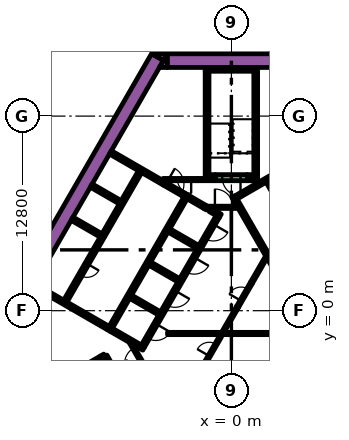
"""IFC4 building model, lengths in metres.
Left out: names, types, materials, properties, quantities, classifications, styles, units other than length and angle.
Written with IfcOpenShell. Run it as: python <this file> out.ifc"""

import sys

from ifc_helpers import new_model, si_unit, direction, frame, frame_2d, origin, place, context, subcontext, project, spatial, polyline, rectangle, outline, extrude, element, fill, save


model = new_model("IFC4")
c1 = context("Model", 3, precision=1e-05, world=origin(), true_north=direction((0.0, 1.0)))
c2 = subcontext(c1, "Body", "Model", "MODEL_VIEW")
j1 = project(units=[si_unit("LENGTHUNIT", "METRE"), si_unit("PLANEANGLEUNIT", "RADIAN")], contexts=[c1])
p1 = place(None, origin())
s1 = spatial("IfcSite", under=j1, at=p1, CompositionType="ELEMENT")
p2 = place(p1, origin())
s2 = spatial("IfcBuilding", under=s1, at=p2, CompositionType="ELEMENT")
p3 = place(p2, frame((0.0, 0.0, 16.2)))
s3 = spatial("IfcBuildingStorey", under=s2, at=p3, CompositionType="ELEMENT", Elevation=16.2)
p4 = place(p3, frame((-15.36, -1.503, 0.0), z_axis=(0.0, 0.0, 1.0), x_axis=(0.50000389221, 0.866023156604, 0.0)))
e1 = element("IfcWall", 1, at=p4, inside=s3, PredefinedType="SOLIDWALL", context=c2, shape_type="SweptSolid", body=[
    extrude(rectangle(XDim=21.0, YDim=0.9, at=frame_2d((10.5, 0.0))), origin(), (0.0, 0.0, 1.0), 5.4),
])
p5 = place(p3, origin())
e2 = element("IfcWall", 2, at=p5, inside=s3, PredefinedType="SOLIDWALL", context=c2, shape_type="SweptSolid", body=[
    extrude(outline(polyline([(-4.215, 16.9), (-4.469, 16.46), (-5.231, 16.9), (-4.215, 16.9)])), origin(), (0.0, 0.0, 1.0), 5.4),
])
p6 = place(p3, frame((-4.224, 16.45, 0.0), z_axis=(0.0, 0.0, 1.0), x_axis=(1.0, 0.0, 0.0)))
e3 = element("IfcWall", 3, at=p6, inside=s3, PredefinedType="SOLIDWALL", context=c2, shape_type="SweptSolid", body=[
    extrude(rectangle(XDim=9.488, YDim=0.9, at=frame_2d((4.744, 0.0))), origin(), (0.0, 0.0, 1.0), 5.4),
])
e4 = element("IfcWall", 4, at=p5, inside=s3, PredefinedType="SOLIDWALL", context=c2, shape_type="SweptSolid", body=[
    extrude(outline(polyline([(-4.734, 16.0), (-4.226, 16.88), (-4.226, 16.0), (-4.734, 16.0)])), origin(), (0.0, 0.0, 1.0), 5.4),
])
p7 = place(p3, frame((-1.725, 15.875, 0.0), z_axis=(0.0, 0.0, 1.0), x_axis=(1.0, 0.0, 0.0)))
e5 = element("IfcWall", 5, at=p7, inside=s3, PredefinedType="SOLIDWALL", context=c2, shape_type="SweptSolid", body=[
    extrude(rectangle(XDim=3.45, YDim=0.25, at=frame_2d((1.725, 0.0))), origin(), (0.0, 0.0, 1.0), 5.4),
])
p8 = place(p3, frame((1.6, 8.95, 0.0), z_axis=(0.0, 0.0, 1.0), x_axis=(0.0, 1.0, 0.0)))
e6 = element("IfcWall", 6, at=p8, inside=s3, PredefinedType="SOLIDWALL", context=c2, shape_type="SweptSolid", body=[
    extrude(rectangle(XDim=6.8, YDim=0.25, at=frame_2d((3.4, 0.0))), origin(), (0.0, 0.0, 1.0), 5.4),
])
p9 = place(p3, frame((1.05, 8.825, 0.0), z_axis=(0.0, 0.0, 1.0), x_axis=(1.0, 0.0, 0.0)))
e7 = element("IfcWall", 7, at=p9, inside=s3, PredefinedType="SOLIDWALL", context=c2, shape_type="SweptSolid", body=[
    extrude(rectangle(XDim=0.675, YDim=0.25, at=frame_2d((0.337, 0.0))), origin(), (0.0, 0.0, 1.0), 5.4),
])
p10 = place(p3, frame((-1.6, 8.7, 0.0), z_axis=(0.0, 0.0, 1.0), x_axis=(0.0, 1.0, 0.0)))
e8 = element("IfcWall", 8, at=p10, inside=s3, PredefinedType="SOLIDWALL", context=c2, shape_type="SweptSolid", body=[
    extrude(rectangle(XDim=7.05, YDim=0.25, at=frame_2d((3.525, 0.0))), origin(), (0.0, 0.0, 1.0), 5.4),
])
p11 = place(p3, frame((-1.475, 8.825, 0.0), z_axis=(0.0, 0.0, 1.0), x_axis=(1.0, 0.0, 0.0)))
e9 = element("IfcWall", 9, at=p11, inside=s3, PredefinedType="SOLIDWALL", context=c2, shape_type="SweptSolid", body=[
    extrude(rectangle(XDim=0.425, YDim=0.25, at=frame_2d((0.212, 0.0))), origin(), (0.0, 0.0, 1.0), 5.4),
])
p12 = place(p3, frame((-14.44, -6.49, 0.0), z_axis=(0.0, 0.0, 1.0), x_axis=(0.866022966069, 0.500004222222, 0.0)))
e10 = element("IfcWall", 10, at=p12, inside=s3, PredefinedType="SOLIDWALL", context=c2, shape_type="SweptSolid", body=[
    extrude(rectangle(XDim=6.8, YDim=0.25, at=frame_2d((3.4, 0.0))), origin(), (0.0, 0.0, 1.0), 5.4),
])
p13 = place(p3, frame((-8.168, -3.503, 0.0), z_axis=(0.0, 0.0, 1.0), x_axis=(-0.499952099219, 0.866053057547, 0.0)))
e11 = element("IfcWall", 11, at=p13, inside=s3, PredefinedType="SOLIDWALL", context=c2, shape_type="SweptSolid", body=[
    extrude(rectangle(XDim=0.675, YDim=0.25, at=frame_2d((0.337, 0.0))), origin(), (0.0, 0.0, 1.0), 5.4),
])
e12 = element("IfcWall", 12, at=p5, inside=s3, PredefinedType="SOLIDWALL", context=c2, shape_type="SweptSolid", body=[
    extrude(outline(polyline([(6.552, -3.348), (6.677, -3.564), (6.46, -3.689), (0.448, 6.725), (0.565, 6.725), (0.566, 6.725), (0.566, 6.725), (0.566, 6.875), (0.566, 6.875), (0.565, 6.875), (0.361, 6.875), (0.035, 7.439), (0.252, 7.564), (0.377, 7.348), (6.552, -3.348)])), origin(), (0.0, 0.0, 1.0), 5.4),
])
p14 = place(p3, frame((0.314, 7.456, 0.0), z_axis=(0.0, 0.0, 1.0), x_axis=(0.866013897511, 0.50001992892, 0.0)))
e13 = element("IfcWall", 13, at=p14, inside=s3, PredefinedType="SOLIDWALL", context=c2, shape_type="SweptSolid", body=[
    extrude(rectangle(XDim=3.268, YDim=0.25, at=frame_2d((1.634, 0.0))), origin(), (0.0, 0.0, 1.0), 5.4),
])
p15 = place(p3, frame((-8.06, -1.311, 0.0), z_axis=(0.0, 0.0, 1.0), x_axis=(0.50000273126, 0.866023826885, 0.0)))
e14 = element("IfcWall", 14, at=p15, inside=s3, PredefinedType="SOLIDWALL", context=c2, shape_type="SweptSolid", body=[
    extrude(rectangle(XDim=10.33, YDim=0.25, at=frame_2d((5.165, 0.0))), origin(), (0.0, 0.0, 1.0), 5.4),
])
p16 = place(p3, frame((-1.758, 6.835, 0.0), z_axis=(0.0, 0.0, 1.0), x_axis=(0.865982457891, -0.500074377092, 0.0)))
e15 = element("IfcWall", 15, at=p16, inside=s3, PredefinedType="SOLIDWALL", context=c2, shape_type="SweptSolid", body=[
    extrude(rectangle(XDim=0.2, YDim=0.25, at=frame_2d((0.1, 0.0))), origin(), (0.0, 0.0, 1.0), 5.4),
])
p17 = place(p3, frame((-1.76, 6.836, 0.0), z_axis=(0.0, 0.0, 1.0), x_axis=(-0.865952863304, 0.500125622755, 0.0)))
e16 = element("IfcWall", 16, at=p17, inside=s3, PredefinedType="SOLIDWALL", context=c2, shape_type="SweptSolid", body=[
    extrude(rectangle(XDim=1.258, YDim=0.25, at=frame_2d((0.629, 0.0))), origin(), (0.0, 0.0, 1.0), 5.4),
])
p18 = place(p3, frame((-0.728, 6.24, 0.0), z_axis=(0.0, 0.0, 1.0), x_axis=(-0.865955664968, 0.500120771724, 0.0)))
e17 = element("IfcWall", 17, at=p18, inside=s3, PredefinedType="SOLIDWALL", context=c2, shape_type="SweptSolid", body=[
    extrude(rectangle(XDim=0.778, YDim=0.25, at=frame_2d((0.389, 0.0))), origin(), (0.0, 0.0, 1.0), 5.4),
])
for number, where, z_axis, x_axis in (
    (18, (-2.204, 4.182, 0.0), (0.0, 0.0, 1.0), (-0.866, 0.5, 0.0)),
    (19, (-5.369, 3.1, 0.0), (0.0, 0.0, 1.0), (0.866, -0.5, 0.0)),
    (20, (-4.724, -0.182, 0.0), (0.0, 0.0, 1.0), (-0.866, 0.5, 0.0)),
):
    element("IfcWall", number, at=place(p3, frame(where, z_axis=z_axis, x_axis=x_axis)), inside=s3, PredefinedType="SOLIDWALL", context=c2, shape_type="SweptSolid", body=[
        extrude(rectangle(XDim=2.2, YDim=0.25, at=frame_2d((1.1, 0.0))), origin(), (0.0, 0.0, 1.0), 5.4),
    ])
e21 = element("IfcWall", 21, at=p5, inside=s3, PredefinedType="SOLIDWALL", context=c2, shape_type="SweptSolid", body=[
    extrude(outline(polyline([(-5.922, -2.257), (-5.922, -2.257), (-5.705, -2.382), (-5.83, -2.598), (-6.483, -2.221), (-6.591, -2.033), (-6.591, -2.033), (-6.7, -2.096), (-7.952, -1.373), (-7.827, -1.156), (-5.922, -2.257)])), origin(), (0.0, 0.0, 1.0), 5.4),
])
p19 = place(p3, frame((-8.106, -1.14, 0.0), z_axis=(0.0, 0.0, 1.0), x_axis=(-0.866000643155, 0.500042884217, 0.0)))
e22 = element("IfcWall", 22, at=p19, inside=s3, PredefinedType="SOLIDWALL", context=c2, shape_type="SweptSolid", body=[
    extrude(rectangle(XDim=5.65, YDim=0.25, at=frame_2d((2.825, 0.0))), origin(), (0.0, 0.0, 1.0), 5.4),
])
e23 = element("IfcWall", 23, at=p5, inside=s3, PredefinedType="SOLIDWALL", context=c2, shape_type="SweptSolid", body=[
    extrude(outline(polyline([(-3.128, 7.481), (-3.259, 7.557), (-3.134, 7.773), (-3.003, 7.698), (-3.128, 7.481)])), origin(), (0.0, 0.0, 1.0), 5.4),
])
for number, where, z_axis, x_axis in (
    (24, (-8.574, 4.95, 0.0), (0.0, 0.0, 1.0), (-0.866, 0.5, 0.0)),
    (25, (-7.314, 7.132, 0.0), (0.0, 0.0, 1.0), (-0.866, 0.5, 0.0)),
):
    element("IfcWall", number, at=place(p3, frame(where, z_axis=z_axis, x_axis=x_axis)), inside=s3, PredefinedType="SOLIDWALL", context=c2, shape_type="SweptSolid", body=[
        extrude(rectangle(XDim=2.2, YDim=0.25, at=frame_2d((1.1, 0.0))), origin(), (0.0, 0.0, 1.0), 5.4),
    ])
p20 = place(p3, frame((-7.959, 10.415, 0.0), z_axis=(0.0, 0.0, 1.0), x_axis=(0.866020958405, -0.500007699544, 0.0)))
e26 = element("IfcWall", 26, at=p20, inside=s3, PredefinedType="SOLIDWALL", context=c2, shape_type="SweptSolid", body=[
    extrude(rectangle(XDim=4.1, YDim=0.25, at=frame_2d((2.05, 0.0))), origin(), (0.0, 0.0, 1.0), 5.4),
])
p21 = place(p3, frame((-8.252, -2.958, 0.0), z_axis=(0.0, 0.0, 1.0), x_axis=(0.500174715838, -0.865924508047, 0.0)))
e27 = element("IfcWall", 27, at=p21, inside=s3, PredefinedType="PARTITIONING", context=c2, shape_type="SweptSolid", body=[
    extrude(rectangle(XDim=0.514, YDim=0.15, at=frame_2d((0.257, 0.0))), origin(), (0.0, 0.0, 1.0), 4.1),
])
p22 = place(p3, frame((-3.997, 8.625, 0.0), z_axis=(0.0, 0.0, 1.0), x_axis=(-1.0, 0.0, 0.0)))
e28 = element("IfcWall", 28, at=p22, inside=s3, PredefinedType="PARTITIONING", context=c2, shape_type="SweptSolid", body=[
    extrude(rectangle(XDim=0.502, YDim=0.15, at=frame_2d((0.251, 0.0))), origin(), (0.0, 0.0, 1.0), 4.1),
])
p23 = place(p3, frame((-2.196, 8.625, 0.0), z_axis=(0.0, 0.0, 1.0), x_axis=(1.0, 0.0, 0.0)))
e29 = element("IfcWall", 29, at=p23, inside=s3, PredefinedType="PARTITIONING", context=c2, shape_type="SweptSolid", body=[
    extrude(rectangle(XDim=1.146, YDim=0.15, at=frame_2d((0.573, 0.0))), origin(), (0.0, 0.0, 1.0), 4.1),
])
p24 = place(p3, frame((-4.2, -1.5, 0.0), z_axis=(0.0, 0.0, 1.0), x_axis=(1.0, 0.0, 0.0)))
e30 = element("IfcWall", 30, at=p24, inside=s3, PredefinedType="PARTITIONING", context=c2, shape_type="SweptSolid", body=[
    extrude(rectangle(XDim=9.359, YDim=0.15, at=frame_2d((4.68, 0.0))), origin(), (0.0, 0.0, 1.0), 4.1),
])
p25 = place(p3, frame((-0.544, -1.393, 0.0), z_axis=(0.0, 0.0, 1.0), x_axis=(0.499928740635, 0.866066541489, 0.0)))
e31 = element("IfcWall", 31, at=p25, inside=s3, PredefinedType="PARTITIONING", context=c2, shape_type="SweptSolid", body=[
    extrude(rectangle(XDim=1.912, YDim=0.15, at=frame_2d((0.956, 0.0))), origin(), (0.0, 0.0, 1.0), 4.1),
])
p26 = place(p3, frame((1.312, 1.822, 0.0), z_axis=(0.0, 0.0, 1.0), x_axis=(0.500003549559, 0.866023354436, 0.0)))
e32 = element("IfcWall", 32, at=p26, inside=s3, PredefinedType="PARTITIONING", context=c2, shape_type="SweptSolid", body=[
    extrude(rectangle(XDim=1.93, YDim=0.15, at=frame_2d((0.965, 0.0))), origin(), (0.0, 0.0, 1.0), 4.1),
])
p27 = place(p3, frame((1.05, 8.625, 0.0), z_axis=(0.0, 0.0, 1.0), x_axis=(1.0, 0.0, 0.0)))
e33 = element("IfcWall", 33, at=p27, inside=s3, PredefinedType="PARTITIONING", context=c2, shape_type="SweptSolid", body=[
    extrude(rectangle(XDim=0.514, YDim=0.15, at=frame_2d((0.257, 0.0))), origin(), (0.0, 0.0, 1.0), 4.1),
])
p28 = place(p3, frame((8.565, -2.185, 0.0), z_axis=(0.0, 0.0, 1.0), x_axis=(-0.499997954832, 0.866026584559, 0.0)))
e34 = element("IfcWall", 34, at=p28, inside=s3, PredefinedType="SOLIDWALL", context=c2, shape_type="SweptSolid", body=[
    extrude(rectangle(XDim=12.35, YDim=0.25, at=frame_2d((6.175, 0.0))), origin(), (0.0, 0.0, 1.0), 5.4),
])
p29 = place(p28, frame((5.725, 0.0, 0.0)))
e35 = element("IfcOpeningElement", 35, at=p29, cuts=e34, PredefinedType="OPENING", context=c2, shape_type="SweptSolid", body=[
    extrude(rectangle(XDim=0.9, YDim=2.1, at=frame_2d((0.45, 1.05))), frame((0.0, 0.135, 0.0), z_axis=(0.0, -1.0, 0.0), x_axis=(1.0, 0.0, 0.0)), (0.0, 0.0, 1.0), 0.27),
])
p30 = place(p3, frame((-6.008, 9.144, 0.0), z_axis=(0.0, 0.0, 1.0), x_axis=(-0.500006956611, -0.866021387346, 0.0)))
e36 = element("IfcWall", 36, at=p30, inside=s3, PredefinedType="SOLIDWALL", context=c2, shape_type="SweptSolid", body=[
    extrude(rectangle(XDim=9.83, YDim=0.25, at=frame_2d((4.915, 0.0))), origin(), (0.0, 0.0, 1.0), 5.4),
])
p31 = place(p30, frame((6.985, 0.0, 0.0)))
e37 = element("IfcOpeningElement", 37, at=p31, cuts=e36, PredefinedType="OPENING", context=c2, shape_type="SweptSolid", body=[
    extrude(rectangle(XDim=0.9, YDim=2.1, at=frame_2d((0.45, 1.05))), frame((0.0, 0.135, 0.0), z_axis=(0.0, -1.0, 0.0), x_axis=(1.0, 0.0, 0.0)), (0.0, 0.0, 1.0), 0.27),
])
p32 = place(p3, frame((-0.898, 6.194, 0.0), z_axis=(0.0, 0.0, 1.0), x_axis=(-0.499996202215, -0.866027596426, 0.0)))
e38 = element("IfcWall", 38, at=p32, inside=s3, PredefinedType="SOLIDWALL", context=c2, shape_type="SweptSolid", body=[
    extrude(rectangle(XDim=9.83, YDim=0.25, at=frame_2d((4.915, 0.0))), origin(), (0.0, 0.0, 1.0), 5.4),
])
p33 = place(p32, frame((0.585, 0.0, 0.0)))
e39 = element("IfcOpeningElement", 39, at=p33, cuts=e38, PredefinedType="OPENING", context=c2, shape_type="SweptSolid", body=[
    extrude(rectangle(XDim=1.1, YDim=2.1, at=frame_2d((0.55, 1.05))), frame((0.0, 0.135, 0.0), z_axis=(0.0, -1.0, 0.0), x_axis=(1.0, 0.0, 0.0)), (0.0, 0.0, 1.0), 0.27),
])
p34 = place(p32, frame((3.105, 0.0, 0.0)))
e40 = element("IfcOpeningElement", 40, at=p34, cuts=e38, PredefinedType="OPENING", context=c2, shape_type="SweptSolid", body=[
    extrude(rectangle(XDim=1.1, YDim=2.1, at=frame_2d((0.55, 1.05))), frame((0.0, 0.135, 0.0), z_axis=(0.0, -1.0, 0.0), x_axis=(1.0, 0.0, 0.0)), (0.0, 0.0, 1.0), 0.27),
])
p35 = place(p32, frame((5.625, 0.0, 0.0)))
e41 = element("IfcOpeningElement", 41, at=p35, cuts=e38, PredefinedType="OPENING", context=c2, shape_type="SweptSolid", body=[
    extrude(rectangle(XDim=1.1, YDim=2.1, at=frame_2d((0.55, 1.05))), frame((0.0, 0.135, 0.0), z_axis=(0.0, -1.0, 0.0), x_axis=(1.0, 0.0, 0.0)), (0.0, 0.0, 1.0), 0.27),
])
p36 = place(p32, frame((8.145, 0.0, 0.0)))
e42 = element("IfcOpeningElement", 42, at=p36, cuts=e38, PredefinedType="OPENING", context=c2, shape_type="SweptSolid", body=[
    extrude(rectangle(XDim=1.1, YDim=2.1, at=frame_2d((0.55, 1.05))), frame((0.0, 0.135, 0.0), z_axis=(0.0, -1.0, 0.0), x_axis=(1.0, 0.0, 0.0)), (0.0, 0.0, 1.0), 0.27),
])
p37 = place(p3, frame((1.05, 8.75, 0.0), z_axis=(0.0, 0.0, 1.0), x_axis=(-1.0, 0.0, 0.0)))
e43 = element("IfcWall", 43, at=p37, inside=s3, PredefinedType="SOLIDWALL", context=c2, shape_type="SweptSolid", body=[
    extrude(rectangle(XDim=2.1, YDim=0.4, at=frame_2d((1.05, 0.0))), origin(), (0.0, 0.0, 1.0), 5.4),
])
p38 = place(p37, frame((0.45, 0.0, 0.0)))
e44 = element("IfcOpeningElement", 44, at=p38, cuts=e43, PredefinedType="OPENING", context=c2, shape_type="SweptSolid", body=[
    extrude(rectangle(XDim=1.2, YDim=2.1, at=frame_2d((0.6, 1.05))), frame((0.0, 0.21, 0.0), z_axis=(0.0, -1.0, 0.0), x_axis=(1.0, 0.0, 0.0)), (0.0, 0.0, 1.0), 0.42),
])
p39 = place(p3, frame((-2.196, 8.625, 0.0), z_axis=(0.0, 0.0, 1.0), x_axis=(-1.0, 0.0, 0.0)))
e45 = element("IfcWall", 45, at=p39, inside=s3, PredefinedType="PARTITIONING", context=c2, shape_type="SweptSolid", body=[
    extrude(rectangle(XDim=1.8, YDim=0.15, at=frame_2d((0.9, 0.0))), origin(), (0.0, 0.0, 1.0), 4.1),
])
p40 = place(p39, frame((0.45, 0.0, 0.0)))
e46 = element("IfcOpeningElement", 46, at=p40, cuts=e45, PredefinedType="OPENING", context=c2, shape_type="SweptSolid", body=[
    extrude(rectangle(XDim=0.9, YDim=2.1, at=frame_2d((0.45, 1.05))), frame((0.0, 0.085, 0.0), z_axis=(0.0, -1.0, 0.0), x_axis=(1.0, 0.0, 0.0)), (0.0, 0.0, 1.0), 0.17),
])
p41 = place(p3, frame((-1.76, -3.498, 0.0), z_axis=(0.0, 0.0, 1.0), x_axis=(0.499977374825, 0.866038466041, 0.0)))
e47 = element("IfcWall", 47, at=p41, inside=s3, PredefinedType="PARTITIONING", context=c2, shape_type="SweptSolid", body=[
    extrude(rectangle(XDim=2.1, YDim=0.15, at=frame_2d((1.05, 0.0))), origin(), (0.0, 0.0, 1.0), 4.1),
])
p42 = place(p41, frame((0.6, 0.0, 0.0)))
e48 = element("IfcOpeningElement", 48, at=p42, cuts=e47, PredefinedType="OPENING", context=c2, shape_type="SweptSolid", body=[
    extrude(rectangle(XDim=0.9, YDim=2.1, at=frame_2d((0.45, 1.05))), frame((0.0, 0.085, 0.0), z_axis=(0.0, -1.0, 0.0), x_axis=(1.0, 0.0, 0.0)), (0.0, 0.0, 1.0), 0.17),
])
p43 = place(p3, frame((-1.534, 6.8, 0.0), z_axis=(0.0, 0.0, 1.0), x_axis=(1.0, 0.0, 0.0)))
e49 = element("IfcWall", 49, at=p43, inside=s3, PredefinedType="PARTITIONING", context=c2, shape_type="SweptSolid", body=[
    extrude(rectangle(XDim=2.1, YDim=0.15, at=frame_2d((1.05, 0.0))), origin(), (0.0, 0.0, 1.0), 4.1),
])
p44 = place(p43, frame((0.45, 0.0, 0.0)))
e50 = element("IfcOpeningElement", 50, at=p44, cuts=e49, PredefinedType="OPENING", context=c2, shape_type="SweptSolid", body=[
    extrude(rectangle(XDim=1.2, YDim=2.1, at=frame_2d((0.6, 1.05))), frame((0.0, 0.085, 0.0), z_axis=(0.0, -1.0, 0.0), x_axis=(1.0, 0.0, 0.0)), (0.0, 0.0, 1.0), 0.17),
])
p45 = place(p3, frame((-5.606, -3.89, 0.0), z_axis=(0.0, 0.0, 1.0), x_axis=(-0.500027713859, 0.866009402589, 0.0)))
e51 = element("IfcWall", 51, at=p45, inside=s3, PredefinedType="PARTITIONING", context=c2, shape_type="SweptSolid", body=[
    extrude(rectangle(XDim=2.1, YDim=0.15, at=frame_2d((1.05, 0.0))), origin(), (0.0, 0.0, 1.0), 4.1),
])
p46 = place(p45, frame((0.45, 0.0, 0.0)))
e52 = element("IfcOpeningElement", 52, at=p46, cuts=e51, PredefinedType="OPENING", context=c2, shape_type="SweptSolid", body=[
    extrude(rectangle(XDim=1.2, YDim=2.1, at=frame_2d((0.6, 1.05))), frame((0.0, 0.085, 0.0), z_axis=(0.0, -1.0, 0.0), x_axis=(1.0, 0.0, 0.0)), (0.0, 0.0, 1.0), 0.17),
])
p47 = place(p3, frame((-4.409, 8.365, 0.0), z_axis=(0.0, 0.0, 1.0), x_axis=(0.866034573852, -0.49998411664, 0.0)))
e53 = element("IfcWall", 53, at=p47, inside=s3, PredefinedType="SOLIDWALL", context=c2, shape_type="SweptSolid", body=[
    extrude(rectangle(XDim=1.4, YDim=0.25, at=frame_2d((0.7, 0.0))), origin(), (0.0, 0.0, 1.0), 5.4),
])
p48 = place(p47, frame((0.1, 0.0, 0.0)))
e54 = element("IfcOpeningElement", 54, at=p48, cuts=e53, PredefinedType="OPENING", context=c2, shape_type="SweptSolid", body=[
    extrude(rectangle(XDim=1.2, YDim=2.1, at=frame_2d((0.6, 1.05))), frame((0.0, 0.135, 0.0), z_axis=(0.0, -1.0, 0.0), x_axis=(1.0, 0.0, 0.0)), (0.0, 0.0, 1.0), 0.27),
])
p49 = place(p3, frame((0.412, 0.263, 0.0), z_axis=(0.0, 0.0, 1.0), x_axis=(0.500062916607, 0.865989075817, 0.0)))
e55 = element("IfcWall", 55, at=p49, inside=s3, PredefinedType="PARTITIONING", context=c2, shape_type="SweptSolid", body=[
    extrude(rectangle(XDim=1.8, YDim=0.15, at=frame_2d((0.9, 0.0))), origin(), (0.0, 0.0, 1.0), 4.1),
])
p50 = place(p49, frame((0.45, 0.0, 0.0)))
e56 = element("IfcOpeningElement", 56, at=p50, cuts=e55, PredefinedType="OPENING", context=c2, shape_type="SweptSolid", body=[
    extrude(rectangle(XDim=0.9, YDim=2.1, at=frame_2d((0.45, 1.05))), frame((0.0, 0.085, 0.0), z_axis=(0.0, -1.0, 0.0), x_axis=(1.0, 0.0, 0.0)), (0.0, 0.0, 1.0), 0.17),
])
p51 = place(p3, frame((-6.875, 40.198, 0.0), z_axis=(0.0, 0.0, 1.0), x_axis=(-0.500000527961, -0.866025098966, 0.0)))
e57 = element("IfcWall", 57, at=p51, inside=s3, PredefinedType="SOLIDWALL", context=c2, shape_type="SweptSolid", body=[
    extrude(rectangle(XDim=62.75, YDim=0.25, at=frame_2d((31.375, 0.0))), origin(), (0.0, 0.0, 1.0), 5.0),
])
p52 = place(p31, origin())
e58 = element("IfcDoor", 58, at=p52, inside=s3, OperationType="SINGLE_SWING_LEFT", PredefinedType="DOOR", context=c2, shape_type="SweptSolid", body=[
    extrude(rectangle(XDim=0.9, YDim=2.1, at=frame_2d((0.45, 1.05))), frame((0.0, 0.025, 0.0), z_axis=(0.0, -1.0, 0.0), x_axis=(1.0, 0.0, 0.0)), (0.0, 0.0, 1.0), 0.05),
])
fill(e37, e58)
p53 = place(p33, origin())
e59 = element("IfcDoor", 59, at=p53, inside=s3, OperationType="DOUBLE_DOOR_SLIDING", PredefinedType="DOOR", context=c2, shape_type="SweptSolid", body=[
    extrude(rectangle(XDim=1.1, YDim=2.1, at=frame_2d((0.55, 1.05))), frame((0.0, 0.025, 0.0), z_axis=(0.0, -1.0, 0.0), x_axis=(1.0, 0.0, 0.0)), (0.0, 0.0, 1.0), 0.05),
])
fill(e39, e59)
p54 = place(p34, origin())
e60 = element("IfcDoor", 60, at=p54, inside=s3, OperationType="DOUBLE_DOOR_SLIDING", PredefinedType="DOOR", context=c2, shape_type="SweptSolid", body=[
    extrude(rectangle(XDim=1.1, YDim=2.1, at=frame_2d((0.55, 1.05))), frame((0.0, 0.025, 0.0), z_axis=(0.0, -1.0, 0.0), x_axis=(1.0, 0.0, 0.0)), (0.0, 0.0, 1.0), 0.05),
])
fill(e40, e60)
p55 = place(p35, origin())
e61 = element("IfcDoor", 61, at=p55, inside=s3, OperationType="DOUBLE_DOOR_SLIDING", PredefinedType="DOOR", context=c2, shape_type="SweptSolid", body=[
    extrude(rectangle(XDim=1.1, YDim=2.1, at=frame_2d((0.55, 1.05))), frame((0.0, 0.025, 0.0), z_axis=(0.0, -1.0, 0.0), x_axis=(1.0, 0.0, 0.0)), (0.0, 0.0, 1.0), 0.05),
])
fill(e41, e61)
p56 = place(p36, origin())
e62 = element("IfcDoor", 62, at=p56, inside=s3, OperationType="DOUBLE_DOOR_SLIDING", PredefinedType="DOOR", context=c2, shape_type="SweptSolid", body=[
    extrude(rectangle(XDim=1.1, YDim=2.1, at=frame_2d((0.55, 1.05))), frame((0.0, 0.025, 0.0), z_axis=(0.0, -1.0, 0.0), x_axis=(1.0, 0.0, 0.0)), (0.0, 0.0, 1.0), 0.05),
])
fill(e42, e62)
p57 = place(p38, origin())
e63 = element("IfcDoor", 63, at=p57, inside=s3, OperationType="SINGLE_SWING_LEFT", PredefinedType="DOOR", context=c2, shape_type="SweptSolid", body=[
    extrude(rectangle(XDim=1.2, YDim=2.1, at=frame_2d((0.6, 1.05))), frame((0.0, 0.025, 0.0), z_axis=(0.0, -1.0, 0.0), x_axis=(1.0, 0.0, 0.0)), (0.0, 0.0, 1.0), 0.05),
])
fill(e44, e63)
p58 = place(p40, origin())
e64 = element("IfcDoor", 64, at=p58, inside=s3, OperationType="SINGLE_SWING_LEFT", PredefinedType="DOOR", context=c2, shape_type="SweptSolid", body=[
    extrude(rectangle(XDim=0.9, YDim=2.1, at=frame_2d((0.45, 1.05))), frame((0.0, 0.025, 0.0), z_axis=(0.0, -1.0, 0.0), x_axis=(1.0, 0.0, 0.0)), (0.0, 0.0, 1.0), 0.05),
])
fill(e46, e64)
p59 = place(p42, origin())
e65 = element("IfcDoor", 65, at=p59, inside=s3, OperationType="SINGLE_SWING_LEFT", PredefinedType="DOOR", context=c2, shape_type="SweptSolid", body=[
    extrude(rectangle(XDim=0.9, YDim=2.1, at=frame_2d((0.45, 1.05))), frame((0.0, 0.025, 0.0), z_axis=(0.0, -1.0, 0.0), x_axis=(1.0, 0.0, 0.0)), (0.0, 0.0, 1.0), 0.05),
])
fill(e48, e65)
p60 = place(p44, origin())
e66 = element("IfcDoor", 66, at=p60, inside=s3, OperationType="SINGLE_SWING_LEFT", PredefinedType="DOOR", context=c2, shape_type="SweptSolid", body=[
    extrude(rectangle(XDim=1.2, YDim=2.1, at=frame_2d((0.6, 1.05))), frame((0.0, 0.025, 0.0), z_axis=(0.0, -1.0, 0.0), x_axis=(1.0, 0.0, 0.0)), (0.0, 0.0, 1.0), 0.05),
])
fill(e50, e66)
p61 = place(p46, origin())
e67 = element("IfcDoor", 67, at=p61, inside=s3, OperationType="SINGLE_SWING_LEFT", PredefinedType="DOOR", context=c2, shape_type="SweptSolid", body=[
    extrude(rectangle(XDim=1.2, YDim=2.1, at=frame_2d((0.6, 1.05))), frame((0.0, 0.025, 0.0), z_axis=(0.0, -1.0, 0.0), x_axis=(1.0, 0.0, 0.0)), (0.0, 0.0, 1.0), 0.05),
])
fill(e52, e67)
p62 = place(p48, origin())
e68 = element("IfcDoor", 68, at=p62, inside=s3, OperationType="SINGLE_SWING_LEFT", PredefinedType="DOOR", context=c2, shape_type="SweptSolid", body=[
    extrude(rectangle(XDim=1.2, YDim=2.1, at=frame_2d((0.6, 1.05))), frame((0.0, 0.025, 0.0), z_axis=(0.0, -1.0, 0.0), x_axis=(1.0, 0.0, 0.0)), (0.0, 0.0, 1.0), 0.05),
])
fill(e54, e68)
p63 = place(p50, origin())
e69 = element("IfcDoor", 69, at=p63, inside=s3, OperationType="SINGLE_SWING_LEFT", PredefinedType="DOOR", context=c2, shape_type="SweptSolid", body=[
    extrude(rectangle(XDim=0.9, YDim=2.1, at=frame_2d((0.45, 1.05))), frame((0.0, 0.025, 0.0), z_axis=(0.0, -1.0, 0.0), x_axis=(1.0, 0.0, 0.0)), (0.0, 0.0, 1.0), 0.05),
])
fill(e56, e69)
save(model, sys.argv[1])
